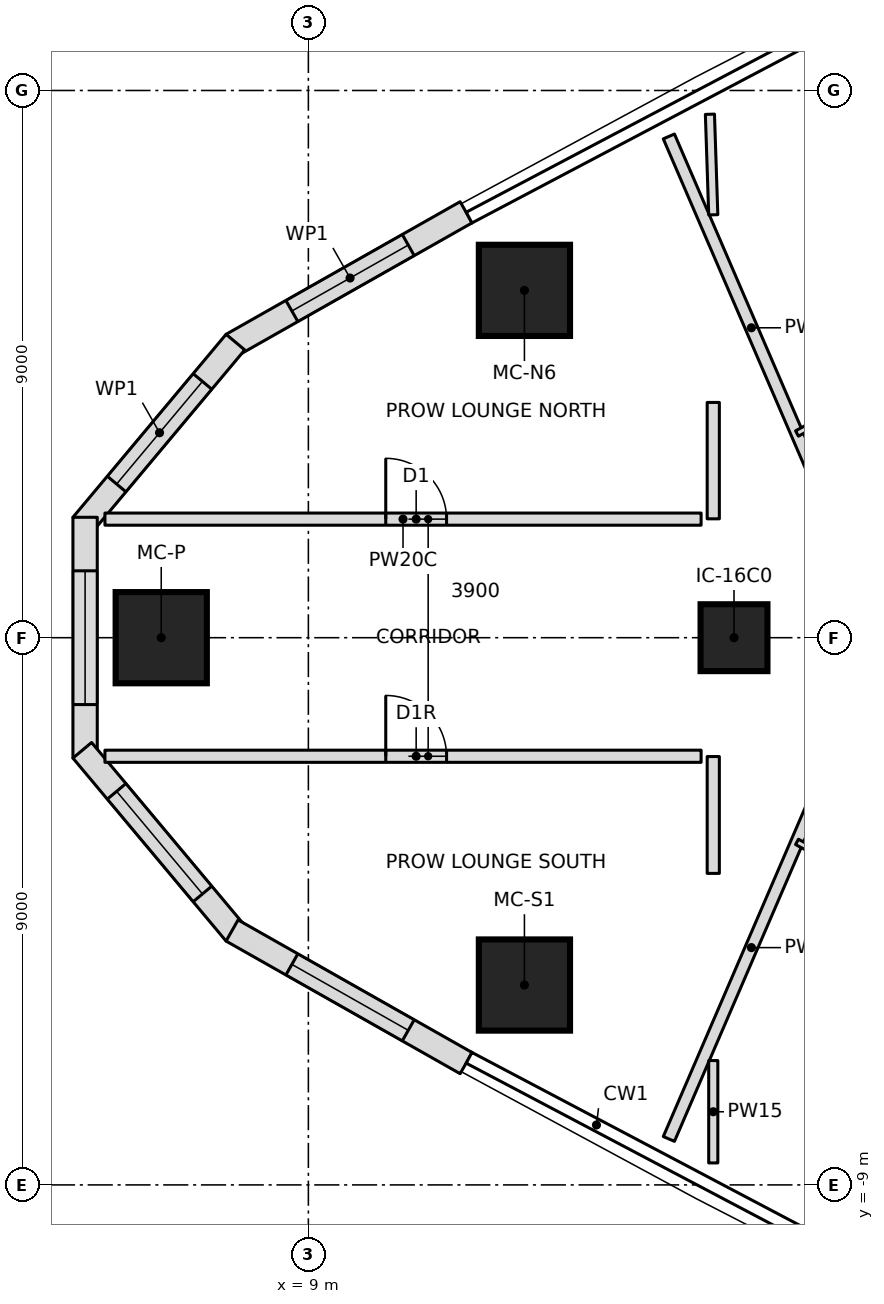
"""IFC4 building model, lengths in metres.
Left out: names, types, materials, properties, quantities, classifications, styles, units other than length and angle.
Written with IfcOpenShell. Run it as: python <this file> out.ifc"""

import sys

from ifc_helpers import new_model, si_unit, direction, frame, frame_2d, origin, origin_2d, place, context, subcontext, project, spatial, polyline, rectangle, outline, extrude, element, fill, save


model = new_model("IFC4")
c1 = context("Model", 3, precision=1e-05, world=origin(), true_north=direction((0.0, 1.0)))
c2 = subcontext(c1, "Body", "Model", "MODEL_VIEW")
j1 = project(units=[si_unit("LENGTHUNIT", "METRE"), si_unit("PLANEANGLEUNIT", "RADIAN")], contexts=[c1])
p1 = place(None, origin())
s1 = spatial("IfcSite", under=j1, at=p1, CompositionType="ELEMENT")
p2 = place(p1, origin())
s2 = spatial("IfcBuilding", under=s1, at=p2, CompositionType="ELEMENT")
p3 = place(p2, frame((0.0, 0.0, 147.95)))
s3 = spatial("IfcBuildingStorey", under=s2, at=p3, CompositionType="ELEMENT", Elevation=147.95)
for number, where, z_axis, x_axis in (
    (1, (6.58, 0.0, 0.0), (0.0, 0.0, 1.0), (1.0, 0.0, 0.0)),
    (2, (12.553, -5.713, 0.0), (0.0, 0.0, 1.0), (1.0, 0.0, 0.0)),
    (3, (12.553, 5.713, 0.0), (0.0, 0.0, 1.0), (1.0, 0.0, 0.0)),
):
    element("IfcColumn", number, at=place(p3, frame(where, z_axis=z_axis, x_axis=x_axis)), inside=s3, PredefinedType="COLUMN", context=c2, shape_type="SweptSolid", body=[
        extrude(rectangle(XDim=1.5, YDim=1.5, at=origin_2d()), origin(), (0.0, 0.0, 1.0), 3.55),
    ])
p4 = place(p3, frame((16.0, 0.0, 0.0), z_axis=(0.0, 0.0, 1.0), x_axis=(1.0, 0.0, 0.0)))
e4 = element("IfcColumn", 4, at=p4, inside=s3, PredefinedType="COLUMN", context=c2, shape_type="SweptSolid", body=[
    extrude(rectangle(XDim=1.1, YDim=1.1, at=origin_2d()), origin(), (0.0, 0.0, 1.0), 3.55),
])
p5 = place(p3, frame((11.594, 6.997, 0.0), z_axis=(0.0, 0.0, 1.0), x_axis=(-0.870045255208, -0.492971859125, 0.0)))
e5 = element("IfcWall", 5, at=p5, inside=s3, PredefinedType="NOTDEFINED", context=c2, shape_type="SweptSolid", body=[
    extrude(outline(polyline([(0.0, -0.2), (4.424, -0.2), (4.352, 0.2), (0.0, 0.2), (0.0, -0.2)])), origin(), (0.0, 0.0, 1.0), 3.25),
])
p6 = place(p5, frame((1.094, 0.0, 0.6)))
e6 = element("IfcOpeningElement", 6, at=p6, cuts=e5, PredefinedType="OPENING", context=c2, shape_type="SweptSolid", body=[
    extrude(outline(polyline([(0.0, 1.35), (0.084, 1.771), (0.322, 2.128), (0.679, 2.366), (1.1, 2.45), (1.521, 2.366), (1.878, 2.128), (2.116, 1.771), (2.2, 1.35), (2.2, 1.1), (2.116, 0.679), (1.878, 0.322), (1.521, 0.084), (1.1, 0.0), (0.679, 0.084), (0.322, 0.322), (0.084, 0.679), (0.0, 1.1), (0.0, 1.35)])), frame((0.0, 0.21, 0.0), z_axis=(0.0, -1.0, 0.0), x_axis=(1.0, 0.0, 0.0)), (0.0, 0.0, 1.0), 0.42),
])
p7 = place(p3, frame((7.777, 4.834, 0.0), z_axis=(0.0, 0.0, 1.0), x_axis=(-0.641787918235, -0.766882173484, 0.0)))
e7 = element("IfcWall", 7, at=p7, inside=s3, PredefinedType="NOTDEFINED", context=c2, shape_type="SweptSolid", body=[
    extrude(outline(polyline([(-0.036, -0.2), (3.888, -0.2), (3.743, 0.2), (0.036, 0.2), (-0.036, -0.2)])), origin(), (0.0, 0.0, 1.0), 3.25),
])
p8 = place(p7, frame((0.808, 0.0, 0.6)))
e8 = element("IfcOpeningElement", 8, at=p8, cuts=e7, PredefinedType="OPENING", context=c2, shape_type="SweptSolid", body=[
    extrude(outline(polyline([(0.0, 1.35), (0.084, 1.771), (0.322, 2.128), (0.679, 2.366), (1.1, 2.45), (1.521, 2.366), (1.878, 2.128), (2.116, 1.771), (2.2, 1.35), (2.2, 1.1), (2.116, 0.679), (1.878, 0.322), (1.521, 0.084), (1.1, 0.0), (0.679, 0.084), (0.322, 0.322), (0.084, 0.679), (0.0, 1.1), (0.0, 1.35)])), frame((0.0, 0.21, 0.0), z_axis=(0.0, -1.0, 0.0), x_axis=(1.0, 0.0, 0.0)), (0.0, 0.0, 1.0), 0.42),
])
p9 = place(p3, frame((5.328, 1.908, 0.0), z_axis=(0.0, 0.0, 1.0), x_axis=(0.0, -1.0, 0.0)))
e9 = element("IfcWall", 9, at=p9, inside=s3, PredefinedType="NOTDEFINED", context=c2, shape_type="SweptSolid", body=[
    extrude(outline(polyline([(-0.073, -0.2), (3.888, -0.2), (3.743, 0.2), (0.073, 0.2), (-0.073, -0.2)])), origin(), (0.0, 0.0, 1.0), 3.25),
])
p10 = place(p9, frame((0.808, 0.0, 0.6)))
e10 = element("IfcOpeningElement", 10, at=p10, cuts=e9, PredefinedType="OPENING", context=c2, shape_type="SweptSolid", body=[
    extrude(outline(polyline([(0.0, 1.35), (0.084, 1.771), (0.322, 2.128), (0.679, 2.366), (1.1, 2.45), (1.521, 2.366), (1.878, 2.128), (2.116, 1.771), (2.2, 1.35), (2.2, 1.1), (2.116, 0.679), (1.878, 0.322), (1.521, 0.084), (1.1, 0.0), (0.679, 0.084), (0.322, 0.322), (0.084, 0.679), (0.0, 1.1), (0.0, 1.35)])), frame((0.0, 0.21, 0.0), z_axis=(0.0, -1.0, 0.0), x_axis=(1.0, 0.0, 0.0)), (0.0, 0.0, 1.0), 0.42),
])
p11 = place(p3, frame((5.328, -1.908, 0.0), z_axis=(0.0, 0.0, 1.0), x_axis=(0.641787918235, -0.766882173484, 0.0)))
e11 = element("IfcWall", 11, at=p11, inside=s3, PredefinedType="NOTDEFINED", context=c2, shape_type="SweptSolid", body=[
    extrude(outline(polyline([(-0.073, -0.2), (3.852, -0.2), (3.779, 0.2), (0.073, 0.2), (-0.073, -0.2)])), origin(), (0.0, 0.0, 1.0), 3.25),
])
p12 = place(p11, frame((0.808, 0.0, 0.6)))
e12 = element("IfcOpeningElement", 12, at=p12, cuts=e11, PredefinedType="OPENING", context=c2, shape_type="SweptSolid", body=[
    extrude(outline(polyline([(0.0, 1.35), (0.084, 1.771), (0.322, 2.128), (0.679, 2.366), (1.1, 2.45), (1.521, 2.366), (1.878, 2.128), (2.116, 1.771), (2.2, 1.35), (2.2, 1.1), (2.116, 0.679), (1.878, 0.322), (1.521, 0.084), (1.1, 0.0), (0.679, 0.084), (0.322, 0.322), (0.084, 0.679), (0.0, 1.1), (0.0, 1.35)])), frame((0.0, 0.21, 0.0), z_axis=(0.0, -1.0, 0.0), x_axis=(1.0, 0.0, 0.0)), (0.0, 0.0, 1.0), 0.42),
])
p13 = place(p3, frame((7.777, -4.834, 0.0), z_axis=(0.0, 0.0, 1.0), x_axis=(0.870045255208, -0.492971859125, 0.0)))
e13 = element("IfcWall", 13, at=p13, inside=s3, PredefinedType="NOTDEFINED", context=c2, shape_type="SweptSolid", body=[
    extrude(outline(polyline([(-0.036, -0.2), (4.388, -0.2), (4.388, 0.2), (0.036, 0.2), (-0.036, -0.2)])), origin(), (0.0, 0.0, 1.0), 3.25),
])
p14 = place(p13, frame((1.094, 0.0, 0.6)))
e14 = element("IfcOpeningElement", 14, at=p14, cuts=e13, PredefinedType="OPENING", context=c2, shape_type="SweptSolid", body=[
    extrude(outline(polyline([(0.0, 1.35), (0.084, 1.771), (0.322, 2.128), (0.679, 2.366), (1.1, 2.45), (1.521, 2.366), (1.878, 2.128), (2.116, 1.771), (2.2, 1.35), (2.2, 1.1), (2.116, 0.679), (1.878, 0.322), (1.521, 0.084), (1.1, 0.0), (0.679, 0.084), (0.322, 0.322), (0.084, 0.679), (0.0, 1.1), (0.0, 1.35)])), frame((0.0, 0.21, 0.0), z_axis=(0.0, -1.0, 0.0), x_axis=(1.0, 0.0, 0.0)), (0.0, 0.0, 1.0), 0.42),
])
p15 = place(p3, frame((5.654, 1.95, 0.0), z_axis=(0.0, 0.0, 1.0), x_axis=(1.0, 0.0, 0.0)))
e15 = element("IfcWall", 15, at=p15, inside=s3, PredefinedType="PARTITIONING", context=c2, shape_type="SweptSolid", body=[
    extrude(rectangle(XDim=9.804, YDim=0.2, at=frame_2d((4.902, 0.0))), origin(), (0.0, 0.0, 1.0), 3.25),
])
p16 = place(p15, frame((4.618, 0.0, 0.0)))
e16 = element("IfcOpeningElement", 16, at=p16, cuts=e15, PredefinedType="OPENING", context=c2, shape_type="SweptSolid", body=[
    extrude(rectangle(XDim=1.0, YDim=2.1, at=frame_2d((0.5, 1.05))), frame((0.0, 0.11, 0.0), z_axis=(0.0, -1.0, 0.0), x_axis=(1.0, 0.0, 0.0)), (0.0, 0.0, 1.0), 0.22),
])
p17 = place(p3, frame((5.654, -1.95, 0.0), z_axis=(0.0, 0.0, 1.0), x_axis=(1.0, 0.0, 0.0)))
e17 = element("IfcWall", 17, at=p17, inside=s3, PredefinedType="PARTITIONING", context=c2, shape_type="SweptSolid", body=[
    extrude(rectangle(XDim=9.804, YDim=0.2, at=frame_2d((4.902, 0.0))), origin(), (0.0, 0.0, 1.0), 3.25),
])
p18 = place(p17, frame((4.618, 0.0, 0.0)))
e18 = element("IfcOpeningElement", 18, at=p18, cuts=e17, PredefinedType="OPENING", context=c2, shape_type="SweptSolid", body=[
    extrude(rectangle(XDim=1.0, YDim=2.1, at=frame_2d((0.5, 1.05))), frame((0.0, 0.11, 0.0), z_axis=(0.0, -1.0, 0.0), x_axis=(1.0, 0.0, 0.0)), (0.0, 0.0, 1.0), 0.22),
])
p19 = place(p3, frame((17.643, 1.95, 0.0), z_axis=(0.0, 0.0, 1.0), x_axis=(-0.395994543879, 0.918252863441, 0.0)))
e19 = element("IfcWall", 19, at=p19, inside=s3, PredefinedType="PARTITIONING", context=c2, shape_type="SweptSolid", body=[
    extrude(rectangle(XDim=6.854, YDim=0.2, at=frame_2d((3.427, 0.0))), origin(), (0.0, 0.0, 1.0), 3.25),
])
p20 = place(p3, frame((17.036, 3.358, 0.0), z_axis=(0.0, 0.0, 1.0), x_axis=(0.879823588489, 0.475300382009, 0.0)))
e20 = element("IfcWall", 20, at=p20, inside=s3, PredefinedType="PARTITIONING", context=c2, shape_type="SweptSolid", body=[
    extrude(rectangle(XDim=1.273, YDim=0.1, at=frame_2d((0.636, 0.0))), origin(), (0.0, 0.0, 1.0), 3.25),
])
p21 = place(p3, frame((14.929, -8.244, 0.0), z_axis=(0.0, 0.0, 1.0), x_axis=(0.395994543879, 0.918252863441, 0.0)))
e21 = element("IfcWall", 21, at=p21, inside=s3, PredefinedType="PARTITIONING", context=c2, shape_type="SweptSolid", body=[
    extrude(rectangle(XDim=6.854, YDim=0.2, at=frame_2d((3.427, 0.0))), origin(), (0.0, 0.0, 1.0), 3.25),
])
p22 = place(p3, frame((18.156, -3.963, 0.0), z_axis=(0.0, 0.0, 1.0), x_axis=(-0.879823588489, 0.475300382009, 0.0)))
e22 = element("IfcWall", 22, at=p22, inside=s3, PredefinedType="PARTITIONING", context=c2, shape_type="SweptSolid", body=[
    extrude(rectangle(XDim=1.273, YDim=0.1, at=frame_2d((0.636, 0.0))), origin(), (0.0, 0.0, 1.0), 3.25),
])
p23 = place(p3, frame((15.604, 8.609, 0.0), z_axis=(0.0, 0.0, 1.0), x_axis=(0.033196927484, -0.999448830109, 0.0)))
e23 = element("IfcWall", 23, at=p23, inside=s3, PredefinedType="PARTITIONING", context=c2, shape_type="SweptSolid", body=[
    extrude(rectangle(XDim=1.655, YDim=0.15, at=frame_2d((0.827, 0.0))), origin(), (0.0, 0.0, 1.0), 3.25),
])
p24 = place(p3, frame((15.659, -6.955, 0.0), z_axis=(0.0, 0.0, 1.0), x_axis=(0.0, -1.0, 0.0)))
e24 = element("IfcWall", 24, at=p24, inside=s3, PredefinedType="PARTITIONING", context=c2, shape_type="SweptSolid", body=[
    extrude(rectangle(XDim=1.684, YDim=0.15, at=frame_2d((0.842, 0.0))), origin(), (0.0, 0.0, 1.0), 3.25),
])
p25 = place(p3, frame((15.659, 3.869, 0.0), z_axis=(0.0, 0.0, 1.0), x_axis=(0.0, -1.0, 0.0)))
e25 = element("IfcWall", 25, at=p25, inside=s3, PredefinedType="PARTITIONING", context=c2, shape_type="SweptSolid", body=[
    extrude(rectangle(XDim=1.914, YDim=0.2, at=frame_2d((0.957, 0.0))), origin(), (0.0, 0.0, 1.0), 3.25),
])
p26 = place(p3, frame((15.659, -1.955, 0.0), z_axis=(0.0, 0.0, 1.0), x_axis=(0.0, -1.0, 0.0)))
e26 = element("IfcWall", 26, at=p26, inside=s3, PredefinedType="PARTITIONING", context=c2, shape_type="SweptSolid", body=[
    extrude(rectangle(XDim=1.922, YDim=0.2, at=frame_2d((0.961, 0.0))), origin(), (0.0, 0.0, 1.0), 3.25),
])
p27 = place(p6, origin())
e27 = element("IfcWindow", 27, at=p27, inside=s3, PartitioningType="SINGLE_PANEL", PredefinedType="WINDOW", context=c2, shape_type="SweptSolid", body=[
    extrude(outline(polyline([(0.0, 1.35), (0.084, 1.771), (0.322, 2.128), (0.679, 2.366), (1.1, 2.45), (1.521, 2.366), (1.878, 2.128), (2.116, 1.771), (2.2, 1.35), (2.2, 1.1), (2.116, 0.679), (1.878, 0.322), (1.521, 0.084), (1.1, 0.0), (0.679, 0.084), (0.322, 0.322), (0.084, 0.679), (0.0, 1.1), (0.0, 1.35)])), frame((0.0, 0.17, 0.0), z_axis=(0.0, -1.0, 0.0), x_axis=(1.0, 0.0, 0.0)), (0.0, 0.0, 1.0), 0.06),
])
fill(e6, e27)
p28 = place(p8, origin())
e28 = element("IfcWindow", 28, at=p28, inside=s3, PartitioningType="SINGLE_PANEL", PredefinedType="WINDOW", context=c2, shape_type="SweptSolid", body=[
    extrude(outline(polyline([(0.0, 1.35), (0.084, 1.771), (0.322, 2.128), (0.679, 2.366), (1.1, 2.45), (1.521, 2.366), (1.878, 2.128), (2.116, 1.771), (2.2, 1.35), (2.2, 1.1), (2.116, 0.679), (1.878, 0.322), (1.521, 0.084), (1.1, 0.0), (0.679, 0.084), (0.322, 0.322), (0.084, 0.679), (0.0, 1.1), (0.0, 1.35)])), frame((0.0, 0.17, 0.0), z_axis=(0.0, -1.0, 0.0), x_axis=(1.0, 0.0, 0.0)), (0.0, 0.0, 1.0), 0.06),
])
fill(e8, e28)
p29 = place(p10, origin())
e29 = element("IfcWindow", 29, at=p29, inside=s3, PartitioningType="SINGLE_PANEL", PredefinedType="WINDOW", context=c2, shape_type="SweptSolid", body=[
    extrude(outline(polyline([(0.0, 1.35), (0.084, 1.771), (0.322, 2.128), (0.679, 2.366), (1.1, 2.45), (1.521, 2.366), (1.878, 2.128), (2.116, 1.771), (2.2, 1.35), (2.2, 1.1), (2.116, 0.679), (1.878, 0.322), (1.521, 0.084), (1.1, 0.0), (0.679, 0.084), (0.322, 0.322), (0.084, 0.679), (0.0, 1.1), (0.0, 1.35)])), frame((0.0, 0.17, 0.0), z_axis=(0.0, -1.0, 0.0), x_axis=(1.0, 0.0, 0.0)), (0.0, 0.0, 1.0), 0.06),
])
fill(e10, e29)
p30 = place(p12, origin())
e30 = element("IfcWindow", 30, at=p30, inside=s3, PartitioningType="SINGLE_PANEL", PredefinedType="WINDOW", context=c2, shape_type="SweptSolid", body=[
    extrude(outline(polyline([(0.0, 1.35), (0.084, 1.771), (0.322, 2.128), (0.679, 2.366), (1.1, 2.45), (1.521, 2.366), (1.878, 2.128), (2.116, 1.771), (2.2, 1.35), (2.2, 1.1), (2.116, 0.679), (1.878, 0.322), (1.521, 0.084), (1.1, 0.0), (0.679, 0.084), (0.322, 0.322), (0.084, 0.679), (0.0, 1.1), (0.0, 1.35)])), frame((0.0, 0.17, 0.0), z_axis=(0.0, -1.0, 0.0), x_axis=(1.0, 0.0, 0.0)), (0.0, 0.0, 1.0), 0.06),
])
fill(e12, e30)
p31 = place(p14, origin())
e31 = element("IfcWindow", 31, at=p31, inside=s3, PartitioningType="SINGLE_PANEL", PredefinedType="WINDOW", context=c2, shape_type="SweptSolid", body=[
    extrude(outline(polyline([(0.0, 1.35), (0.084, 1.771), (0.322, 2.128), (0.679, 2.366), (1.1, 2.45), (1.521, 2.366), (1.878, 2.128), (2.116, 1.771), (2.2, 1.35), (2.2, 1.1), (2.116, 0.679), (1.878, 0.322), (1.521, 0.084), (1.1, 0.0), (0.679, 0.084), (0.322, 0.322), (0.084, 0.679), (0.0, 1.1), (0.0, 1.35)])), frame((0.0, 0.17, 0.0), z_axis=(0.0, -1.0, 0.0), x_axis=(1.0, 0.0, 0.0)), (0.0, 0.0, 1.0), 0.06),
])
fill(e14, e31)
p32 = place(p16, origin())
e32 = element("IfcDoor", 32, at=p32, inside=s3, OperationType="SINGLE_SWING_LEFT", PredefinedType="DOOR", context=c2, shape_type="SweptSolid", body=[
    extrude(rectangle(XDim=1.0, YDim=2.1, at=frame_2d((0.5, 1.05))), frame((0.0, 0.025, 0.0), z_axis=(0.0, -1.0, 0.0), x_axis=(1.0, 0.0, 0.0)), (0.0, 0.0, 1.0), 0.05),
])
fill(e16, e32)
p33 = place(p18, origin())
e33 = element("IfcDoor", 33, at=p33, inside=s3, OperationType="SINGLE_SWING_RIGHT", PredefinedType="DOOR", context=c2, shape_type="SweptSolid", body=[
    extrude(rectangle(XDim=1.0, YDim=2.1, at=frame_2d((0.5, 1.05))), frame((0.0, 0.025, 0.0), z_axis=(0.0, -1.0, 0.0), x_axis=(1.0, 0.0, 0.0)), (0.0, 0.0, 1.0), 0.05),
])
fill(e18, e33)
save(model, sys.argv[1])
